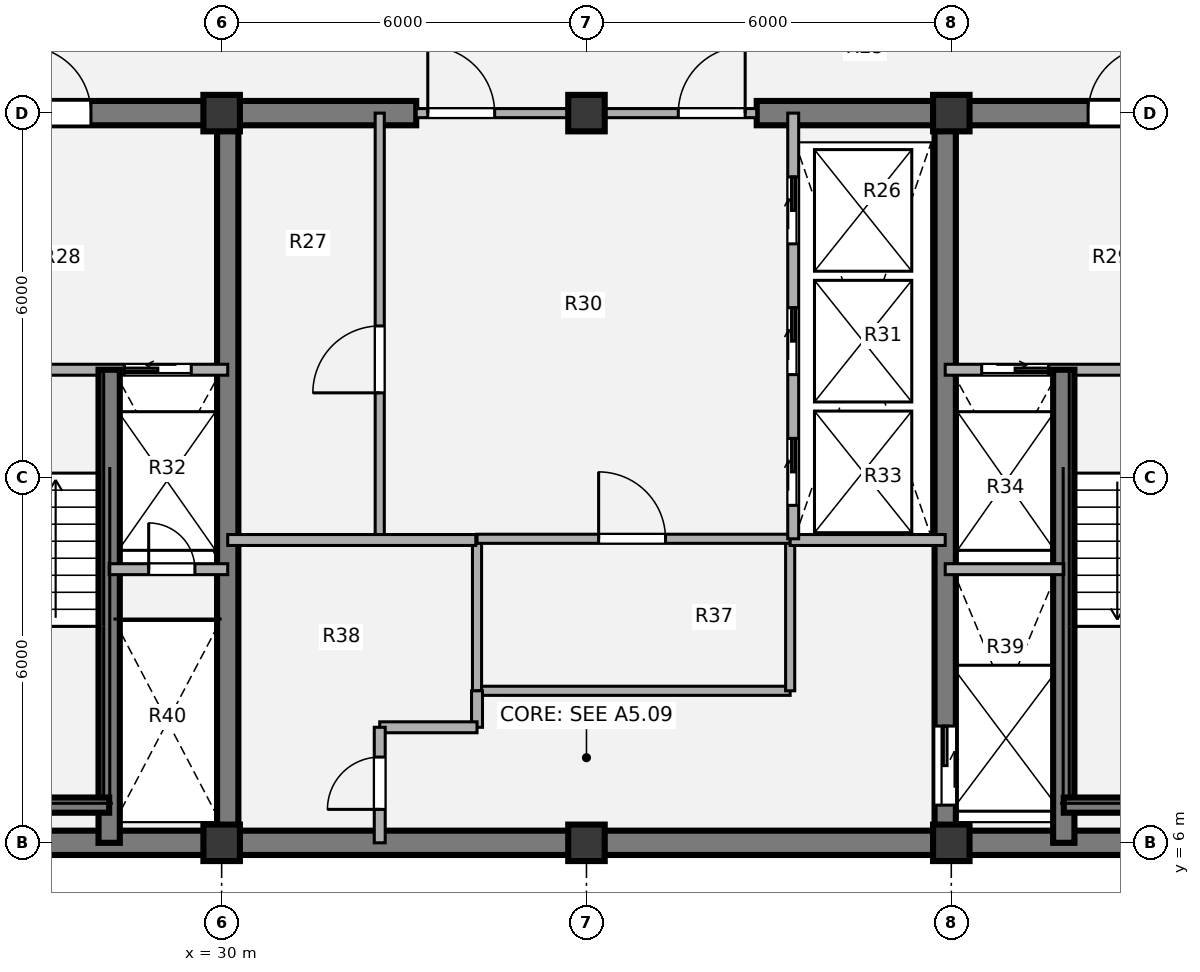
"""IFC4 building model, lengths in metres.
Left out: names, types, materials, properties, quantities, classifications, styles, units other than length and angle.
Written with IfcOpenShell. Run it as: python <this file> out.ifc"""

import sys

from ifc_helpers import new_model, si_unit, direction, frame, frame_2d, origin, origin_2d, place, context, subcontext, project, spatial, rectangle, extrude, source, transform, mapped, element, fill, save


model = new_model("IFC4")
c1 = context("Model", 3, precision=1e-05, world=origin(), true_north=direction((0.0, 1.0)))
c2 = subcontext(c1, "Body", "Model", "MODEL_VIEW")
j1 = project(units=[si_unit("LENGTHUNIT", "METRE"), si_unit("PLANEANGLEUNIT", "RADIAN")], contexts=[c1])
p1 = place(None, origin())
s1 = spatial("IfcSite", under=j1, at=p1, CompositionType="ELEMENT")
p2 = place(p1, origin())
s2 = spatial("IfcBuilding", under=s1, at=p2, CompositionType="ELEMENT")
p3 = place(p2, frame((0.0, 0.0, 230.58)))
s3 = spatial("IfcBuildingStorey", under=s2, at=p3, CompositionType="ELEMENT", Elevation=230.58)
m1 = source(origin(), c2, "Body", "SweptSolid", [
    extrude(rectangle(XDim=0.6, YDim=0.6, at=origin_2d()), origin(), (0.0, 0.0, 1.0), 3.78),
])
for number, where, z_axis, x_axis in (
    (1, (30.0, 6.0, 0.0), (0.0, 0.0, 1.0), (1.0, 0.0, 0.0)),
    (2, (36.0, 6.0, 0.0), (0.0, 0.0, 1.0), (1.0, 0.0, 0.0)),
    (3, (42.0, 6.0, 0.0), (0.0, 0.0, 1.0), (1.0, 0.0, 0.0)),
    (4, (30.0, 18.0, 0.0), (0.0, 0.0, 1.0), (1.0, 0.0, 0.0)),
    (5, (36.0, 18.0, 0.0), (0.0, 0.0, 1.0), (1.0, 0.0, 0.0)),
    (6, (42.0, 18.0, 0.0), (0.0, 0.0, 1.0), (1.0, 0.0, 0.0)),
):
    element("IfcColumn", number, at=place(p3, frame(where, z_axis=z_axis, x_axis=x_axis)), inside=s3, PredefinedType="COLUMN", context=c2, shape_type="MappedRepresentation", body=[
        mapped(m1, transform((0.0, 0.0, 0.0), x_axis=(1.0, 0.0, 0.0), y_axis=(0.0, 1.0, 0.0), z_axis=(0.0, 0.0, 1.0), scale=1.0)),
    ])
p4 = place(p3, frame((48.2, 6.0, 0.0), z_axis=(0.0, 0.0, 1.0), x_axis=(-1.0, 0.0, 0.0)))
e7 = element("IfcWall", 7, at=p4, inside=s3, PredefinedType="SHEAR", context=c2, shape_type="SweptSolid", body=[
    extrude(rectangle(XDim=24.4, YDim=0.4, at=frame_2d((12.2, 0.0))), origin(), (0.0, 0.0, 1.0), 3.78),
])
p5 = place(p3, frame((23.8, 18.0, 0.0), z_axis=(0.0, 0.0, 1.0), x_axis=(1.0, 0.0, 0.0)))
e8 = element("IfcWall", 8, at=p5, inside=s3, PredefinedType="SHEAR", context=c2, shape_type="SweptSolid", body=[
    extrude(rectangle(XDim=9.4, YDim=0.4, at=frame_2d((4.7, 0.0))), origin(), (0.0, 0.0, 1.0), 3.78),
])
p6 = place(p5, frame((2.95, 0.0, 0.0)))
e9 = element("IfcOpeningElement", 9, at=p6, cuts=e8, PredefinedType="OPENING", context=c2, shape_type="SweptSolid", body=[
    extrude(rectangle(XDim=1.1, YDim=2.1, at=origin_2d()), frame((0.55, 0.21, 1.05), z_axis=(0.0, -1.0, 0.0), x_axis=(1.0, 0.0, 0.0)), (0.0, 0.0, 1.0), 0.42),
])
p7 = place(p3, frame((38.8, 18.0, 0.0), z_axis=(0.0, 0.0, 1.0), x_axis=(1.0, 0.0, 0.0)))
e10 = element("IfcWall", 10, at=p7, inside=s3, PredefinedType="SHEAR", context=c2, shape_type="SweptSolid", body=[
    extrude(rectangle(XDim=9.4, YDim=0.4, at=frame_2d((4.7, 0.0))), origin(), (0.0, 0.0, 1.0), 3.78),
])
p8 = place(p7, frame((5.45, 0.0, 0.0)))
e11 = element("IfcOpeningElement", 11, at=p8, cuts=e10, PredefinedType="OPENING", context=c2, shape_type="SweptSolid", body=[
    extrude(rectangle(XDim=1.1, YDim=2.1, at=origin_2d()), frame((0.55, 0.21, 1.05), z_axis=(0.0, -1.0, 0.0), x_axis=(1.0, 0.0, 0.0)), (0.0, 0.0, 1.0), 0.42),
])
p9 = place(p3, frame((30.1, 6.0, 0.0), z_axis=(0.0, 0.0, 1.0), x_axis=(0.0, 1.0, 0.0)))
e12 = element("IfcWall", 12, at=p9, inside=s3, PredefinedType="SHEAR", context=c2, shape_type="SweptSolid", body=[
    extrude(rectangle(XDim=12.0, YDim=0.35, at=frame_2d((6.0, 0.0))), origin(), (0.0, 0.0, 1.0), 3.78),
])
p10 = place(p3, frame((41.9, 18.0, 0.0), z_axis=(0.0, 0.0, 1.0), x_axis=(0.0, -1.0, 0.0)))
e13 = element("IfcWall", 13, at=p10, inside=s3, PredefinedType="SHEAR", context=c2, shape_type="SweptSolid", body=[
    extrude(rectangle(XDim=12.0, YDim=0.35, at=frame_2d((6.0, 0.0))), origin(), (0.0, 0.0, 1.0), 3.78),
])
p11 = place(p10, frame((10.08, 0.0, 0.0)))
e14 = element("IfcOpeningElement", 14, at=p11, cuts=e13, PredefinedType="OPENING", context=c2, shape_type="SweptSolid", body=[
    extrude(rectangle(XDim=1.3, YDim=2.1, at=origin_2d()), frame((0.65, 0.185, 1.05), z_axis=(0.0, -1.0, 0.0), x_axis=(1.0, 0.0, 0.0)), (0.0, 0.0, 1.0), 0.37),
])
p12 = place(p3, frame((32.6, 11.0, 0.0), z_axis=(0.0, 0.0, 1.0), x_axis=(0.0, 1.0, 0.0)))
e15 = element("IfcWall", 15, at=p12, inside=s3, PredefinedType="PARTITIONING", context=c2, shape_type="SweptSolid", body=[
    extrude(rectangle(XDim=7.0, YDim=0.15, at=frame_2d((3.5, 0.0))), origin(), (0.0, 0.0, 1.0), 3.5),
])
p13 = place(p12, frame((2.4, 0.0, 0.0)))
e16 = element("IfcOpeningElement", 16, at=p13, cuts=e15, PredefinedType="OPENING", context=c2, shape_type="SweptSolid", body=[
    extrude(rectangle(XDim=1.1, YDim=2.1, at=origin_2d()), frame((0.55, 0.085, 1.05), z_axis=(0.0, -1.0, 0.0), x_axis=(1.0, 0.0, 0.0)), (0.0, 0.0, 1.0), 0.17),
])
p14 = place(p3, frame((34.2, 8.5, 0.0), z_axis=(0.0, 0.0, 1.0), x_axis=(1.0, 0.0, 0.0)))
e17 = element("IfcWall", 17, at=p14, inside=s3, PredefinedType="PARTITIONING", context=c2, shape_type="SweptSolid", body=[
    extrude(rectangle(XDim=5.15, YDim=0.15, at=frame_2d((2.575, 0.0))), origin(), (0.0, 0.0, 1.0), 3.5),
])
for number, where, z_axis, x_axis in (
    (18, (34.2, 8.5, 0.0), (0.0, 0.0, 1.0), (0.0, 1.0, 0.0)),
    (19, (39.35, 8.5, 0.0), (0.0, 0.0, 1.0), (0.0, 1.0, 0.0)),
):
    element("IfcWall", number, at=place(p3, frame(where, z_axis=z_axis, x_axis=x_axis)), inside=s3, PredefinedType="PARTITIONING", context=c2, shape_type="SweptSolid", body=[
        extrude(rectangle(XDim=2.5, YDim=0.15, at=frame_2d((1.25, 0.0))), origin(), (0.0, 0.0, 1.0), 3.5),
    ])
p15 = place(p3, frame((34.2, 11.0, 0.0), z_axis=(0.0, 0.0, 1.0), x_axis=(1.0, 0.0, 0.0)))
e20 = element("IfcWall", 20, at=p15, inside=s3, PredefinedType="PARTITIONING", context=c2, shape_type="SweptSolid", body=[
    extrude(rectangle(XDim=5.15, YDim=0.15, at=frame_2d((2.575, 0.0))), origin(), (0.0, 0.0, 1.0), 3.5),
])
p16 = place(p15, frame((2.0, 0.0, 0.0)))
e21 = element("IfcOpeningElement", 21, at=p16, cuts=e20, PredefinedType="OPENING", context=c2, shape_type="SweptSolid", body=[
    extrude(rectangle(XDim=1.1, YDim=2.1, at=origin_2d()), frame((0.55, 0.085, 1.05), z_axis=(0.0, -1.0, 0.0), x_axis=(1.0, 0.0, 0.0)), (0.0, 0.0, 1.0), 0.17),
])
p17 = place(p3, frame((30.1, 10.98, 0.0), z_axis=(0.0, 0.0, 1.0), x_axis=(1.0, 0.0, 0.0)))
e22 = element("IfcWall", 22, at=p17, inside=s3, PredefinedType="PARTITIONING", context=c2, shape_type="SweptSolid", body=[
    extrude(rectangle(XDim=4.08, YDim=0.18, at=frame_2d((2.04, 0.0))), origin(), (0.0, 0.0, 1.0), 3.5),
])
p18 = place(p3, frame((34.2, 7.9, 0.0), z_axis=(0.0, 0.0, 1.0), x_axis=(0.0, 1.0, 0.0)))
e23 = element("IfcWall", 23, at=p18, inside=s3, PredefinedType="PARTITIONING", context=c2, shape_type="SweptSolid", body=[
    extrude(rectangle(XDim=0.6, YDim=0.18, at=frame_2d((0.3, 0.0))), origin(), (0.0, 0.0, 1.0), 3.5),
])
p19 = place(p3, frame((32.6, 7.9, 0.0), z_axis=(0.0, 0.0, 1.0), x_axis=(1.0, 0.0, 0.0)))
e24 = element("IfcWall", 24, at=p19, inside=s3, PredefinedType="PARTITIONING", context=c2, shape_type="SweptSolid", body=[
    extrude(rectangle(XDim=1.6, YDim=0.18, at=frame_2d((0.8, 0.0))), origin(), (0.0, 0.0, 1.0), 3.5),
])
p20 = place(p3, frame((32.6, 6.0, 0.0), z_axis=(0.0, 0.0, 1.0), x_axis=(0.0, 1.0, 0.0)))
e25 = element("IfcWall", 25, at=p20, inside=s3, PredefinedType="PARTITIONING", context=c2, shape_type="SweptSolid", body=[
    extrude(rectangle(XDim=1.9, YDim=0.18, at=frame_2d((0.95, 0.0))), origin(), (0.0, 0.0, 1.0), 3.5),
])
p21 = place(p20, frame((0.55, 0.0, 0.0)))
e26 = element("IfcOpeningElement", 26, at=p21, cuts=e25, PredefinedType="OPENING", context=c2, shape_type="SweptSolid", body=[
    extrude(rectangle(XDim=0.86, YDim=2.1, at=origin_2d()), frame((0.43, 0.1, 1.05), z_axis=(0.0, -1.0, 0.0), x_axis=(1.0, 0.0, 0.0)), (0.0, 0.0, 1.0), 0.2),
])
p22 = place(p3, frame((39.35, 10.98, 0.0), z_axis=(0.0, 0.0, 1.0), x_axis=(1.0, 0.0, 0.0)))
e27 = element("IfcWall", 27, at=p22, inside=s3, PredefinedType="PARTITIONING", context=c2, shape_type="SweptSolid", body=[
    extrude(rectangle(XDim=2.55, YDim=0.18, at=frame_2d((1.275, 0.0))), origin(), (0.0, 0.0, 1.0), 3.5),
])
p23 = place(p3, frame((33.2, 18.0, 0.0), z_axis=(0.0, 0.0, 1.0), x_axis=(1.0, 0.0, 0.0)))
e28 = element("IfcWall", 28, at=p23, inside=s3, PredefinedType="PARTITIONING", context=c2, shape_type="SweptSolid", body=[
    extrude(rectangle(XDim=5.6, YDim=0.15, at=frame_2d((2.8, 0.0))), origin(), (0.0, 0.0, 1.0), 2.515),
])
p24 = place(p23, frame((0.19, 0.0, 0.0)))
e29 = element("IfcOpeningElement", 29, at=p24, cuts=e28, PredefinedType="OPENING", context=c2, shape_type="SweptSolid", body=[
    extrude(rectangle(XDim=1.1, YDim=2.1, at=origin_2d()), frame((0.55, 0.085, 1.05), z_axis=(0.0, -1.0, 0.0), x_axis=(1.0, 0.0, 0.0)), (0.0, 0.0, 1.0), 0.17),
])
p25 = place(p23, frame((4.31, 0.0, 0.0)))
e30 = element("IfcOpeningElement", 30, at=p25, cuts=e28, PredefinedType="OPENING", context=c2, shape_type="SweptSolid", body=[
    extrude(rectangle(XDim=1.1, YDim=2.1, at=origin_2d()), frame((0.55, 0.085, 1.05), z_axis=(0.0, -1.0, 0.0), x_axis=(1.0, 0.0, 0.0)), (0.0, 0.0, 1.0), 0.17),
])
p26 = place(p3, frame((24.0, 13.78, 0.0), z_axis=(0.0, 0.0, 1.0), x_axis=(1.0, 0.0, 0.0)))
e31 = element("IfcWall", 31, at=p26, inside=s3, PredefinedType="PARTITIONING", context=c2, shape_type="SweptSolid", body=[
    extrude(rectangle(XDim=6.1, YDim=0.18, at=frame_2d((3.05, 0.0))), origin(), (0.0, 0.0, 1.0), 3.5),
])
p27 = place(p26, frame((1.15, 0.0, 0.0)))
e32 = element("IfcOpeningElement", 32, at=p27, cuts=e31, PredefinedType="OPENING", context=c2, shape_type="SweptSolid", body=[
    extrude(rectangle(XDim=1.1, YDim=2.1, at=origin_2d()), frame((0.55, 0.1, 1.05), z_axis=(0.0, -1.0, 0.0), x_axis=(1.0, 0.0, 0.0)), (0.0, 0.0, 1.0), 0.2),
])
p28 = place(p26, frame((4.4, 0.0, 0.0)))
e33 = element("IfcOpeningElement", 33, at=p28, cuts=e31, PredefinedType="OPENING", context=c2, shape_type="SweptSolid", body=[
    extrude(rectangle(XDim=1.1, YDim=2.1, at=origin_2d()), frame((0.55, 0.1, 1.05), z_axis=(0.0, -1.0, 0.0), x_axis=(1.0, 0.0, 0.0)), (0.0, 0.0, 1.0), 0.2),
])
p29 = place(p3, frame((28.15, 6.0, 0.0), z_axis=(0.0, 0.0, 1.0), x_axis=(0.0, 1.0, 0.0)))
e34 = element("IfcWall", 34, at=p29, inside=s3, PredefinedType="SHEAR", context=c2, shape_type="SweptSolid", body=[
    extrude(rectangle(XDim=7.78, YDim=0.35, at=frame_2d((3.89, 0.0))), origin(), (0.0, 0.0, 1.0), 3.85),
])
p30 = place(p3, frame((24.58, 6.62, 0.0), z_axis=(0.0, 0.0, 1.0), x_axis=(1.0, 0.0, 0.0)))
e35 = element("IfcWall", 35, at=p30, inside=s3, PredefinedType="SHEAR", context=c2, shape_type="SweptSolid", body=[
    extrude(rectangle(XDim=3.57, YDim=0.25, at=frame_2d((1.785, 0.0))), origin(), (0.0, 0.0, 1.0), 3.85),
])
p31 = place(p3, frame((28.15, 10.5, 0.0), z_axis=(0.0, 0.0, 1.0), x_axis=(1.0, 0.0, 0.0)))
e36 = element("IfcWall", 36, at=p31, inside=s3, PredefinedType="PARTITIONING", context=c2, shape_type="SweptSolid", body=[
    extrude(rectangle(XDim=1.95, YDim=0.18, at=frame_2d((0.975, 0.0))), origin(), (0.0, 0.0, 1.0), 3.5),
])
p32 = place(p31, frame((0.65, 0.0, 0.0)))
e37 = element("IfcOpeningElement", 37, at=p32, cuts=e36, PredefinedType="OPENING", context=c2, shape_type="SweptSolid", body=[
    extrude(rectangle(XDim=0.76, YDim=2.05, at=origin_2d()), frame((0.38, 0.1, 1.025), z_axis=(0.0, -1.0, 0.0), x_axis=(1.0, 0.0, 0.0)), (0.0, 0.0, 1.0), 0.2),
])
p33 = place(p3, frame((41.9, 13.78, 0.0), z_axis=(0.0, 0.0, 1.0), x_axis=(1.0, 0.0, 0.0)))
e38 = element("IfcWall", 38, at=p33, inside=s3, PredefinedType="PARTITIONING", context=c2, shape_type="SweptSolid", body=[
    extrude(rectangle(XDim=6.1, YDim=0.18, at=frame_2d((3.05, 0.0))), origin(), (0.0, 0.0, 1.0), 3.5),
])
p34 = place(p33, frame((0.6, 0.0, 0.0)))
e39 = element("IfcOpeningElement", 39, at=p34, cuts=e38, PredefinedType="OPENING", context=c2, shape_type="SweptSolid", body=[
    extrude(rectangle(XDim=1.1, YDim=2.1, at=origin_2d()), frame((0.55, 0.1, 1.05), z_axis=(0.0, -1.0, 0.0), x_axis=(1.0, 0.0, 0.0)), (0.0, 0.0, 1.0), 0.2),
])
p35 = place(p33, frame((3.8, 0.0, 0.0)))
e40 = element("IfcOpeningElement", 40, at=p35, cuts=e38, PredefinedType="OPENING", context=c2, shape_type="SweptSolid", body=[
    extrude(rectangle(XDim=1.1, YDim=2.1, at=origin_2d()), frame((0.55, 0.1, 1.05), z_axis=(0.0, -1.0, 0.0), x_axis=(1.0, 0.0, 0.0)), (0.0, 0.0, 1.0), 0.2),
])
p36 = place(p3, frame((43.85, 6.0, 0.0), z_axis=(0.0, 0.0, 1.0), x_axis=(0.0, 1.0, 0.0)))
e41 = element("IfcWall", 41, at=p36, inside=s3, PredefinedType="SHEAR", context=c2, shape_type="SweptSolid", body=[
    extrude(rectangle(XDim=7.78, YDim=0.35, at=frame_2d((3.89, 0.0))), origin(), (0.0, 0.0, 1.0), 3.85),
])
p37 = place(p3, frame((43.85, 6.62, 0.0), z_axis=(0.0, 0.0, 1.0), x_axis=(1.0, 0.0, 0.0)))
e42 = element("IfcWall", 42, at=p37, inside=s3, PredefinedType="SHEAR", context=c2, shape_type="SweptSolid", body=[
    extrude(rectangle(XDim=3.57, YDim=0.25, at=frame_2d((1.785, 0.0))), origin(), (0.0, 0.0, 1.0), 3.85),
])
p38 = place(p3, frame((41.9, 10.5, 0.0), z_axis=(0.0, 0.0, 1.0), x_axis=(1.0, 0.0, 0.0)))
e43 = element("IfcWall", 43, at=p38, inside=s3, PredefinedType="PARTITIONING", context=c2, shape_type="SweptSolid", body=[
    extrude(rectangle(XDim=1.95, YDim=0.18, at=frame_2d((0.975, 0.0))), origin(), (0.0, 0.0, 1.0), 3.5),
])
p39 = place(p3, frame((39.4, 11.0, 0.0), z_axis=(0.0, 0.0, 1.0), x_axis=(0.0, 1.0, 0.0)))
e44 = element("IfcWall", 44, at=p39, inside=s3, PredefinedType="PARTITIONING", context=c2, shape_type="SweptSolid", body=[
    extrude(rectangle(XDim=7.0, YDim=0.18, at=frame_2d((3.5, 0.0))), origin(), (0.0, 0.0, 1.0), 3.5),
])
p40 = place(p39, frame((0.55, 0.0, 0.0)))
e45 = element("IfcOpeningElement", 45, at=p40, cuts=e44, PredefinedType="OPENING", context=c2, shape_type="SweptSolid", body=[
    extrude(rectangle(XDim=1.1, YDim=2.1, at=origin_2d()), frame((0.55, 0.1, 1.05), z_axis=(0.0, -1.0, 0.0), x_axis=(1.0, 0.0, 0.0)), (0.0, 0.0, 1.0), 0.2),
])
p41 = place(p39, frame((2.7, 0.0, 0.0)))
e46 = element("IfcOpeningElement", 46, at=p41, cuts=e44, PredefinedType="OPENING", context=c2, shape_type="SweptSolid", body=[
    extrude(rectangle(XDim=1.1, YDim=2.1, at=origin_2d()), frame((0.55, 0.1, 1.05), z_axis=(0.0, -1.0, 0.0), x_axis=(1.0, 0.0, 0.0)), (0.0, 0.0, 1.0), 0.2),
])
p42 = place(p39, frame((4.85, 0.0, 0.0)))
e47 = element("IfcOpeningElement", 47, at=p42, cuts=e44, PredefinedType="OPENING", context=c2, shape_type="SweptSolid", body=[
    extrude(rectangle(XDim=1.1, YDim=2.1, at=origin_2d()), frame((0.55, 0.1, 1.05), z_axis=(0.0, -1.0, 0.0), x_axis=(1.0, 0.0, 0.0)), (0.0, 0.0, 1.0), 0.2),
])
m2 = source(origin(), c2, "Body", "SweptSolid", [
    extrude(rectangle(XDim=1.1, YDim=2.1, at=origin_2d()), frame((0.55, 0.025, 1.05), z_axis=(0.0, -1.0, 0.0), x_axis=(1.0, 0.0, 0.0)), (0.0, 0.0, 1.0), 0.05),
])
p43 = place(p13, origin())
e48 = element("IfcDoor", 48, at=p43, inside=s3, OperationType="SINGLE_SWING_LEFT", PredefinedType="DOOR", context=c2, shape_type="MappedRepresentation", body=[
    mapped(m2, transform((0.0, 0.0, 0.0), x_axis=(1.0, 0.0, 0.0), y_axis=(0.0, 1.0, 0.0), z_axis=(0.0, 0.0, 1.0), scale=1.0)),
])
fill(e16, e48)
p44 = place(p16, origin())
e49 = element("IfcDoor", 49, at=p44, inside=s3, OperationType="SINGLE_SWING_LEFT", PredefinedType="DOOR", context=c2, shape_type="MappedRepresentation", body=[
    mapped(m2, transform((0.0, 0.0, 0.0), x_axis=(1.0, 0.0, 0.0), y_axis=(0.0, 1.0, 0.0), z_axis=(0.0, 0.0, 1.0), scale=1.0)),
])
fill(e21, e49)
m3 = source(origin(), c2, "Body", "SweptSolid", [
    extrude(rectangle(XDim=0.86, YDim=2.1, at=origin_2d()), frame((0.43, 0.025, 1.05), z_axis=(0.0, -1.0, 0.0), x_axis=(1.0, 0.0, 0.0)), (0.0, 0.0, 1.0), 0.05),
])
p45 = place(p21, origin())
e50 = element("IfcDoor", 50, at=p45, inside=s3, OperationType="SINGLE_SWING_LEFT", PredefinedType="DOOR", context=c2, shape_type="MappedRepresentation", body=[
    mapped(m3, transform((0.0, 0.0, 0.0), x_axis=(1.0, 0.0, 0.0), y_axis=(0.0, 1.0, 0.0), z_axis=(0.0, 0.0, 1.0), scale=1.0)),
])
fill(e26, e50)
m4 = source(origin(), c2, "Body", "SweptSolid", [
    extrude(rectangle(XDim=1.1, YDim=2.1, at=origin_2d()), frame((0.55, 0.025, 1.05), z_axis=(0.0, -1.0, 0.0), x_axis=(1.0, 0.0, 0.0)), (0.0, 0.0, 1.0), 0.05),
])
p46 = place(p24, origin())
e51 = element("IfcDoor", 51, at=p46, inside=s3, OperationType="SINGLE_SWING_LEFT", PredefinedType="DOOR", context=c2, shape_type="MappedRepresentation", body=[
    mapped(m4, transform((0.0, 0.0, 0.0), x_axis=(1.0, 0.0, 0.0), y_axis=(0.0, 1.0, 0.0), z_axis=(0.0, 0.0, 1.0), scale=1.0)),
])
fill(e29, e51)
p47 = place(p25, origin())
e52 = element("IfcDoor", 52, at=p47, inside=s3, OperationType="SINGLE_SWING_RIGHT", PredefinedType="DOOR", context=c2, shape_type="MappedRepresentation", body=[
    mapped(m4, transform((0.0, 0.0, 0.0), x_axis=(1.0, 0.0, 0.0), y_axis=(0.0, 1.0, 0.0), z_axis=(0.0, 0.0, 1.0), scale=1.0)),
])
fill(e30, e52)
m5 = source(origin(), c2, "Body", "SweptSolid", [
    extrude(rectangle(XDim=1.1, YDim=2.1, at=origin_2d()), frame((0.55, 0.025, 1.05), z_axis=(0.0, -1.0, 0.0), x_axis=(1.0, 0.0, 0.0)), (0.0, 0.0, 1.0), 0.05),
])
p48 = place(p28, origin())
e53 = element("IfcDoor", 53, at=p48, inside=s3, OperationType="SLIDING_TO_LEFT", PredefinedType="DOOR", context=c2, shape_type="MappedRepresentation", body=[
    mapped(m5, transform((0.0, 0.0, 0.0), x_axis=(1.0, 0.0, 0.0), y_axis=(0.0, 1.0, 0.0), z_axis=(0.0, 0.0, 1.0), scale=1.0)),
])
fill(e33, e53)
m6 = source(origin(), c2, "Body", "SweptSolid", [
    extrude(rectangle(XDim=0.76, YDim=2.05, at=origin_2d()), frame((0.38, 0.025, 1.025), z_axis=(0.0, -1.0, 0.0), x_axis=(1.0, 0.0, 0.0)), (0.0, 0.0, 1.0), 0.05),
])
p49 = place(p32, origin())
e54 = element("IfcDoor", 54, at=p49, inside=s3, OperationType="SINGLE_SWING_LEFT", PredefinedType="DOOR", context=c2, shape_type="MappedRepresentation", body=[
    mapped(m6, transform((0.0, 0.0, 0.0), x_axis=(1.0, 0.0, 0.0), y_axis=(0.0, 1.0, 0.0), z_axis=(0.0, 0.0, 1.0), scale=1.0)),
])
fill(e37, e54)
p50 = place(p34, origin())
e55 = element("IfcDoor", 55, at=p50, inside=s3, OperationType="SLIDING_TO_RIGHT", PredefinedType="DOOR", context=c2, shape_type="MappedRepresentation", body=[
    mapped(m5, transform((0.0, 0.0, 0.0), x_axis=(1.0, 0.0, 0.0), y_axis=(0.0, 1.0, 0.0), z_axis=(0.0, 0.0, 1.0), scale=1.0)),
])
fill(e39, e55)
m7 = source(origin(), c2, "Body", "SweptSolid", [
    extrude(rectangle(XDim=1.3, YDim=2.1, at=origin_2d()), frame((0.65, 0.025, 1.05), z_axis=(0.0, -1.0, 0.0), x_axis=(1.0, 0.0, 0.0)), (0.0, 0.0, 1.0), 0.05),
])
p51 = place(p11, origin())
e56 = element("IfcDoor", 56, at=p51, inside=s3, OperationType="SLIDING_TO_LEFT", PredefinedType="DOOR", context=c2, shape_type="MappedRepresentation", body=[
    mapped(m7, transform((0.0, 0.0, 0.0), x_axis=(1.0, 0.0, 0.0), y_axis=(0.0, 1.0, 0.0), z_axis=(0.0, 0.0, 1.0), scale=1.0)),
])
fill(e14, e56)
p52 = place(p6, origin())
e57 = element("IfcDoor", 57, at=p52, inside=s3, OperationType="SINGLE_SWING_LEFT", PredefinedType="DOOR", context=c2, shape_type="MappedRepresentation", body=[
    mapped(m4, transform((0.0, 0.0, 0.0), x_axis=(1.0, 0.0, 0.0), y_axis=(0.0, 1.0, 0.0), z_axis=(0.0, 0.0, 1.0), scale=1.0)),
])
fill(e9, e57)
p53 = place(p8, origin())
e58 = element("IfcDoor", 58, at=p53, inside=s3, OperationType="SINGLE_SWING_RIGHT", PredefinedType="DOOR", context=c2, shape_type="MappedRepresentation", body=[
    mapped(m4, transform((0.0, 0.0, 0.0), x_axis=(1.0, 0.0, 0.0), y_axis=(0.0, 1.0, 0.0), z_axis=(0.0, 0.0, 1.0), scale=1.0)),
])
fill(e11, e58)
p54 = place(p40, origin())
e59 = element("IfcDoor", 59, at=p54, inside=s3, OperationType="SLIDING_TO_RIGHT", PredefinedType="DOOR", context=c2, shape_type="MappedRepresentation", body=[
    mapped(m5, transform((0.0, 0.0, 0.0), x_axis=(1.0, 0.0, 0.0), y_axis=(0.0, 1.0, 0.0), z_axis=(0.0, 0.0, 1.0), scale=1.0)),
])
fill(e45, e59)
p55 = place(p41, origin())
e60 = element("IfcDoor", 60, at=p55, inside=s3, OperationType="SLIDING_TO_RIGHT", PredefinedType="DOOR", context=c2, shape_type="MappedRepresentation", body=[
    mapped(m5, transform((0.0, 0.0, 0.0), x_axis=(1.0, 0.0, 0.0), y_axis=(0.0, 1.0, 0.0), z_axis=(0.0, 0.0, 1.0), scale=1.0)),
])
fill(e46, e60)
p56 = place(p42, origin())
e61 = element("IfcDoor", 61, at=p56, inside=s3, OperationType="SLIDING_TO_RIGHT", PredefinedType="DOOR", context=c2, shape_type="MappedRepresentation", body=[
    mapped(m5, transform((0.0, 0.0, 0.0), x_axis=(1.0, 0.0, 0.0), y_axis=(0.0, 1.0, 0.0), z_axis=(0.0, 0.0, 1.0), scale=1.0)),
])
fill(e47, e61)
save(model, sys.argv[1])
